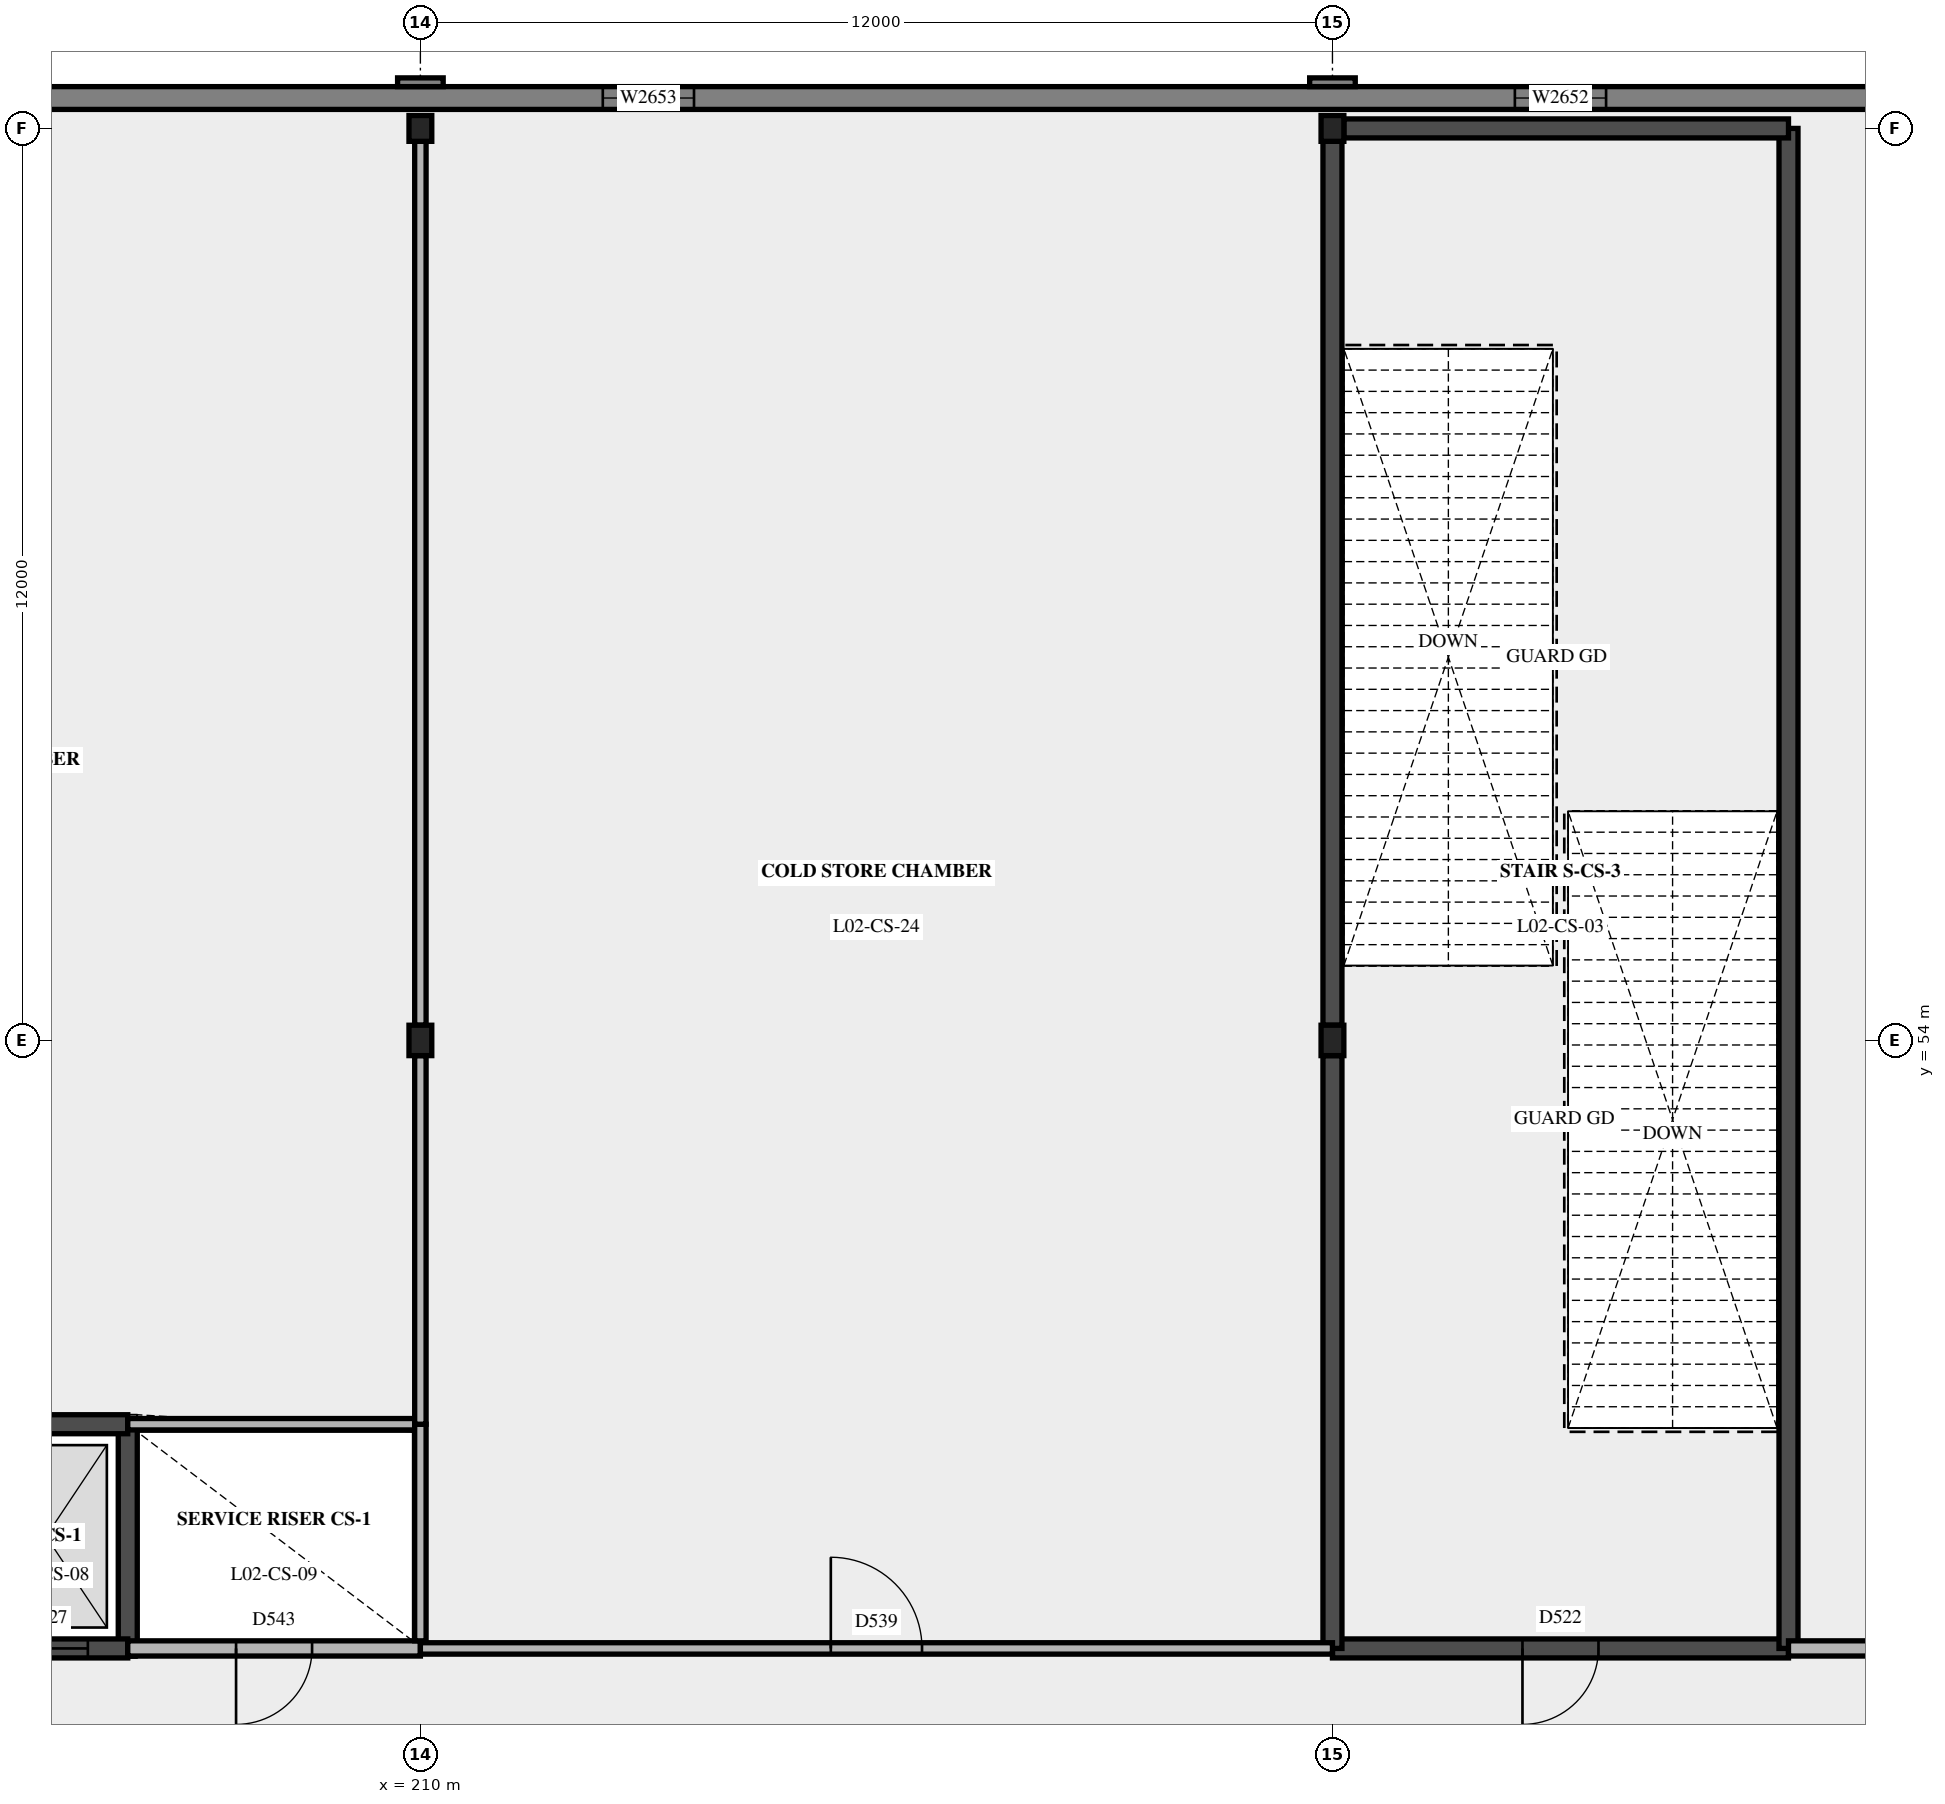
"""IFC4 building model, lengths in metres.
Left out: names, types, materials, properties, quantities, classifications, styles, units other than length and angle.
Written with IfcOpenShell. Run it as: python <this file> out.ifc"""

import sys

from ifc_helpers import new_model, si_unit, direction, frame, frame_2d, origin, origin_2d, place, context, subcontext, project, spatial, polyline, rectangle, i_section, outline, extrude, element, fill, save


model = new_model("IFC4")
c1 = context("Model", 3, precision=1e-05, world=origin(), true_north=direction((0.0, 1.0)))
c2 = subcontext(c1, "Body", "Model", "MODEL_VIEW")
j1 = project(units=[si_unit("LENGTHUNIT", "METRE"), si_unit("PLANEANGLEUNIT", "RADIAN")], contexts=[c1])
p1 = place(None, origin())
s1 = spatial("IfcSite", under=j1, at=p1, CompositionType="ELEMENT")
p2 = place(p1, origin())
s2 = spatial("IfcBuilding", under=s1, at=p2, CompositionType="ELEMENT")
p3 = place(p2, frame((0.0, 0.0, 10.8)))
s3 = spatial("IfcBuildingStorey", under=s2, at=p3, CompositionType="ELEMENT", Elevation=10.8)
p4 = place(p3, frame((210.0, 54.0, 0.0), z_axis=(0.0, 0.0, 1.0), x_axis=(1.0, 0.0, 0.0)))
e1 = element("IfcColumn", 1, at=p4, inside=s3, PredefinedType="COLUMN", context=c2, shape_type="SweptSolid", body=[
    extrude(i_section(OverallWidth=0.3, OverallDepth=0.4, WebThickness=0.013, FlangeThickness=0.024, at=origin_2d()), origin(), (0.0, 0.0, 1.0), 5.4),
])
p5 = place(p3, frame((210.0, 66.0, 0.0), z_axis=(0.0, 0.0, 1.0), x_axis=(1.0, 0.0, 0.0)))
e2 = element("IfcColumn", 2, at=p5, inside=s3, PredefinedType="COLUMN", context=c2, shape_type="SweptSolid", body=[
    extrude(i_section(OverallWidth=0.3, OverallDepth=0.34, WebThickness=0.012, FlangeThickness=0.021, at=origin_2d()), origin(), (0.0, 0.0, 1.0), 5.4),
])
p6 = place(p3, frame((222.0, 54.0, 0.0), z_axis=(0.0, 0.0, 1.0), x_axis=(1.0, 0.0, 0.0)))
e3 = element("IfcColumn", 3, at=p6, inside=s3, PredefinedType="COLUMN", context=c2, shape_type="SweptSolid", body=[
    extrude(i_section(OverallWidth=0.3, OverallDepth=0.4, WebThickness=0.013, FlangeThickness=0.024, at=origin_2d()), origin(), (0.0, 0.0, 1.0), 5.4),
])
p7 = place(p3, frame((222.0, 66.0, 0.0), z_axis=(0.0, 0.0, 1.0), x_axis=(1.0, 0.0, 0.0)))
e4 = element("IfcColumn", 4, at=p7, inside=s3, PredefinedType="COLUMN", context=c2, shape_type="SweptSolid", body=[
    extrude(i_section(OverallWidth=0.3, OverallDepth=0.34, WebThickness=0.012, FlangeThickness=0.021, at=origin_2d()), origin(), (0.0, 0.0, 1.0), 5.4),
])
p8 = place(p3, frame((222.0, 46.0, 0.0), z_axis=(0.0, 0.0, 1.0), x_axis=(1.0, 0.0, 0.0)))
e5 = element("IfcWall", 5, at=p8, inside=s3, PredefinedType="SHEAR", context=c2, shape_type="SweptSolid", body=[
    extrude(rectangle(XDim=6.0, YDim=0.25, at=frame_2d((3.0, 0.0))), origin(), (0.0, 0.0, 1.0), 5.15),
])
p9 = place(p8, frame((2.5, 0.0, 0.0)))
e6 = element("IfcOpeningElement", 6, at=p9, cuts=e5, PredefinedType="OPENING", context=c2, shape_type="SweptSolid", body=[
    extrude(rectangle(XDim=1.0, YDim=2.1, at=frame_2d((0.5, 1.05))), frame((0.0, 0.135, 0.0), z_axis=(0.0, -1.0, 0.0), x_axis=(1.0, 0.0, 0.0)), (0.0, 0.0, 1.0), 0.27),
])
p10 = place(p3, frame((228.0, 46.0, 0.0), z_axis=(0.0, 0.0, 1.0), x_axis=(0.0, 1.0, 0.0)))
e7 = element("IfcWall", 7, at=p10, inside=s3, PredefinedType="SHEAR", context=c2, shape_type="SweptSolid", body=[
    extrude(rectangle(XDim=20.0, YDim=0.25, at=frame_2d((10.0, 0.0))), origin(), (0.0, 0.0, 1.0), 5.15),
])
p11 = place(p3, frame((222.15, 66.0, 0.0), z_axis=(0.0, 0.0, 1.0), x_axis=(1.0, 0.0, 0.0)))
e8 = element("IfcWall", 8, at=p11, inside=s3, PredefinedType="SHEAR", context=c2, shape_type="SweptSolid", body=[
    extrude(rectangle(XDim=5.85, YDim=0.25, at=frame_2d((2.925, 0.0))), origin(), (0.0, 0.0, 1.0), 5.15),
])
p12 = place(p3, frame((222.0, 46.0, 0.0), z_axis=(0.0, 0.0, 1.0), x_axis=(0.0, 1.0, 0.0)))
e9 = element("IfcWall", 9, at=p12, inside=s3, PredefinedType="SHEAR", context=c2, shape_type="SweptSolid", body=[
    extrude(rectangle(XDim=7.8, YDim=0.25, at=frame_2d((3.9, 0.0))), origin(), (0.0, 0.0, 1.0), 5.15),
])
p13 = place(p3, frame((222.0, 54.2, 0.0), z_axis=(0.0, 0.0, 1.0), x_axis=(0.0, 1.0, 0.0)))
e10 = element("IfcWall", 10, at=p13, inside=s3, PredefinedType="SHEAR", context=c2, shape_type="SweptSolid", body=[
    extrude(rectangle(XDim=11.63, YDim=0.25, at=frame_2d((5.815, 0.0))), origin(), (0.0, 0.0, 1.0), 5.15),
])
p14 = place(p3, frame((282.25, 66.4, 0.0), z_axis=(0.0, 0.0, 1.0), x_axis=(-1.0, 0.0, 0.0)))
e11 = element("IfcWall", 11, at=p14, inside=s3, PredefinedType="SOLIDWALL", context=c2, shape_type="SweptSolid", body=[
    extrude(rectangle(XDim=84.5, YDim=0.3, at=frame_2d((42.25, 0.0))), origin(), (0.0, 0.0, 1.0), 5.4),
])
p15 = place(p14, frame((8.65, 0.0, 1.2)))
e12 = element("IfcOpeningElement", 12, at=p15, cuts=e11, PredefinedType="OPENING", context=c2, shape_type="SweptSolid", body=[
    extrude(rectangle(XDim=1.2, YDim=1.5, at=frame_2d((0.6, 0.75))), frame((0.0, 0.16, 0.0), z_axis=(0.0, -1.0, 0.0), x_axis=(1.0, 0.0, 0.0)), (0.0, 0.0, 1.0), 0.32),
])
p16 = place(p14, frame((20.65, 0.0, 1.2)))
e13 = element("IfcOpeningElement", 13, at=p16, cuts=e11, PredefinedType="OPENING", context=c2, shape_type="SweptSolid", body=[
    extrude(rectangle(XDim=1.2, YDim=1.5, at=frame_2d((0.6, 0.75))), frame((0.0, 0.16, 0.0), z_axis=(0.0, -1.0, 0.0), x_axis=(1.0, 0.0, 0.0)), (0.0, 0.0, 1.0), 0.32),
])
p17 = place(p14, frame((32.65, 0.0, 1.2)))
e14 = element("IfcOpeningElement", 14, at=p17, cuts=e11, PredefinedType="OPENING", context=c2, shape_type="SweptSolid", body=[
    extrude(rectangle(XDim=1.2, YDim=1.5, at=frame_2d((0.6, 0.75))), frame((0.0, 0.16, 0.0), z_axis=(0.0, -1.0, 0.0), x_axis=(1.0, 0.0, 0.0)), (0.0, 0.0, 1.0), 0.32),
])
p18 = place(p14, frame((44.65, 0.0, 1.2)))
e15 = element("IfcOpeningElement", 15, at=p18, cuts=e11, PredefinedType="OPENING", context=c2, shape_type="SweptSolid", body=[
    extrude(rectangle(XDim=1.2, YDim=1.5, at=frame_2d((0.6, 0.75))), frame((0.0, 0.16, 0.0), z_axis=(0.0, -1.0, 0.0), x_axis=(1.0, 0.0, 0.0)), (0.0, 0.0, 1.0), 0.32),
])
p19 = place(p14, frame((56.65, 0.0, 1.2)))
e16 = element("IfcOpeningElement", 16, at=p19, cuts=e11, PredefinedType="OPENING", context=c2, shape_type="SweptSolid", body=[
    extrude(rectangle(XDim=1.2, YDim=1.5, at=frame_2d((0.6, 0.75))), frame((0.0, 0.16, 0.0), z_axis=(0.0, -1.0, 0.0), x_axis=(1.0, 0.0, 0.0)), (0.0, 0.0, 1.0), 0.32),
])
p20 = place(p14, frame((68.65, 0.0, 1.2)))
e17 = element("IfcOpeningElement", 17, at=p20, cuts=e11, PredefinedType="OPENING", context=c2, shape_type="SweptSolid", body=[
    extrude(rectangle(XDim=1.2, YDim=1.5, at=frame_2d((0.6, 0.75))), frame((0.0, 0.16, 0.0), z_axis=(0.0, -1.0, 0.0), x_axis=(1.0, 0.0, 0.0)), (0.0, 0.0, 1.0), 0.32),
])
p21 = place(p14, frame((80.65, 0.0, 1.2)))
e18 = element("IfcOpeningElement", 18, at=p21, cuts=e11, PredefinedType="OPENING", context=c2, shape_type="SweptSolid", body=[
    extrude(rectangle(XDim=1.2, YDim=1.5, at=frame_2d((0.6, 0.75))), frame((0.0, 0.16, 0.0), z_axis=(0.0, -1.0, 0.0), x_axis=(1.0, 0.0, 0.0)), (0.0, 0.0, 1.0), 0.32),
])
for number, where, z_axis, x_axis in (
    (19, (222.3, 66.607, 0.0), (0.0, 0.0, 1.0), (-1.0, 0.0, 0.0)),
    (20, (210.3, 66.607, 0.0), (0.0, 0.0, 1.0), (-1.0, 0.0, 0.0)),
):
    element("IfcWall", number, at=place(p3, frame(where, z_axis=z_axis, x_axis=x_axis)), inside=s3, PredefinedType="SOLIDWALL", context=c2, shape_type="SweptSolid", body=[
        extrude(rectangle(XDim=0.6, YDim=0.115, at=frame_2d((0.3, 0.0))), origin(), (0.0, 0.0, 1.0), 5.4),
    ])
p22 = place(p3, frame((206.15, 46.0, 0.0), z_axis=(0.0, 0.0, 1.0), x_axis=(0.0, 1.0, 0.0)))
e21 = element("IfcWall", 21, at=p22, inside=s3, PredefinedType="SHEAR", context=c2, shape_type="SweptSolid", body=[
    extrude(rectangle(XDim=2.95, YDim=0.25, at=frame_2d((1.475, 0.0))), origin(), (0.0, 0.0, 1.0), 5.4),
])
p23 = place(p3, frame((206.15, 48.95, 0.0), z_axis=(0.0, 0.0, 1.0), x_axis=(-1.0, 0.0, 0.0)))
e22 = element("IfcWall", 22, at=p23, inside=s3, PredefinedType="SHEAR", context=c2, shape_type="SweptSolid", body=[
    extrude(rectangle(XDim=2.15, YDim=0.25, at=frame_2d((1.075, 0.0))), origin(), (0.0, 0.0, 1.0), 5.4),
])
p24 = place(p3, frame((204.0, 46.0, 0.0), z_axis=(0.0, 0.0, 1.0), x_axis=(1.0, 0.0, 0.0)))
e23 = element("IfcWall", 23, at=p24, inside=s3, PredefinedType="SHEAR", context=c2, shape_type="SweptSolid", body=[
    extrude(rectangle(XDim=2.15, YDim=0.25, at=frame_2d((1.075, 0.0))), origin(), (0.0, 0.0, 1.0), 5.4),
])
p25 = place(p24, frame((0.525, 0.0, 0.0)))
e24 = element("IfcOpeningElement", 24, at=p25, cuts=e23, PredefinedType="OPENING", context=c2, shape_type="SweptSolid", body=[
    extrude(rectangle(XDim=1.1, YDim=2.1, at=frame_2d((0.55, 1.05))), frame((0.0, 0.135, 0.0), z_axis=(0.0, -1.0, 0.0), x_axis=(1.0, 0.0, 0.0)), (0.0, 0.0, 1.0), 0.27),
])
p26 = place(p3, frame((206.15, 46.0, 0.0), z_axis=(0.0, 0.0, 1.0), x_axis=(1.0, 0.0, 0.0)))
e25 = element("IfcWall", 25, at=p26, inside=s3, PredefinedType="PARTITIONING", context=c2, shape_type="SweptSolid", body=[
    extrude(outline(polyline([(0.0, 0.0), (3.85, 0.0), (3.85, 4.68), (3.755, 4.68), (3.75, 5.15), (1.555, 5.15), (1.55, 4.63), (1.35, 4.63), (1.345, 5.15), (0.0, 5.15), (0.0, 0.0)])), frame((0.0, 0.1, 0.0), z_axis=(0.0, -1.0, 0.0), x_axis=(1.0, 0.0, 0.0)), (0.0, 0.0, 1.0), 0.2),
])
p27 = place(p26, frame((1.425, 0.0, 0.0)))
e26 = element("IfcOpeningElement", 26, at=p27, cuts=e25, PredefinedType="OPENING", context=c2, shape_type="SweptSolid", body=[
    extrude(rectangle(XDim=1.0, YDim=2.1, at=frame_2d((0.5, 1.05))), frame((0.0, 0.11, 0.0), z_axis=(0.0, -1.0, 0.0), x_axis=(1.0, 0.0, 0.0)), (0.0, 0.0, 1.0), 0.22),
])
p28 = place(p3, frame((210.0, 46.0, 0.0), z_axis=(0.0, 0.0, 1.0), x_axis=(1.0, 0.0, 0.0)))
e27 = element("IfcWall", 27, at=p28, inside=s3, PredefinedType="PARTITIONING", context=c2, shape_type="SweptSolid", body=[
    extrude(outline(polyline([(0.0, 0.0), (12.0, 0.0), (12.0, 5.15), (9.705, 5.15), (9.7, 4.63), (9.5, 4.63), (9.495, 5.15), (7.305, 5.15), (7.3, 4.63), (7.1, 4.63), (7.095, 5.15), (4.905, 5.15), (4.9, 4.63), (4.7, 4.63), (4.695, 5.15), (2.505, 5.15), (2.5, 4.63), (2.3, 4.63), (2.295, 5.15), (0.1, 5.15), (0.095, 4.68), (0.0, 4.68), (0.0, 0.0)])), frame((0.0, 0.075, 0.0), z_axis=(0.0, -1.0, 0.0), x_axis=(1.0, 0.0, 0.0)), (0.0, 0.0, 1.0), 0.15),
])
p29 = place(p28, frame((5.4, 0.0, 0.0)))
e28 = element("IfcOpeningElement", 28, at=p29, cuts=e27, PredefinedType="OPENING", context=c2, shape_type="SweptSolid", body=[
    extrude(rectangle(XDim=1.2, YDim=2.4, at=frame_2d((0.6, 1.2))), frame((0.0, 0.085, 0.0), z_axis=(0.0, -1.0, 0.0), x_axis=(1.0, 0.0, 0.0)), (0.0, 0.0, 1.0), 0.17),
])
p30 = place(p3, frame((228.0, 46.0, 0.0), z_axis=(0.0, 0.0, 1.0), x_axis=(1.0, 0.0, 0.0)))
e29 = element("IfcWall", 29, at=p30, inside=s3, PredefinedType="PARTITIONING", context=c2, shape_type="SweptSolid", body=[
    extrude(outline(polyline([(0.0, 0.0), (18.0, 0.0), (18.0, 5.15), (15.705, 5.15), (15.7, 4.63), (15.5, 4.63), (15.495, 5.15), (13.305, 5.15), (13.3, 4.63), (13.1, 4.63), (13.095, 5.15), (10.905, 5.15), (10.9, 4.63), (10.7, 4.63), (10.695, 5.15), (8.505, 5.15), (8.5, 4.63), (8.3, 4.63), (8.295, 5.15), (6.1, 5.15), (6.095, 4.68), (5.905, 4.68), (5.9, 5.15), (3.705, 5.15), (3.7, 4.63), (3.5, 4.63), (3.495, 5.15), (1.305, 5.15), (1.3, 4.63), (1.1, 4.63), (1.095, 5.15), (0.0, 5.15), (0.0, 0.0)])), frame((0.0, 0.1, 0.0), z_axis=(0.0, -1.0, 0.0), x_axis=(1.0, 0.0, 0.0)), (0.0, 0.0, 1.0), 0.2),
])
p31 = place(p30, frame((8.1, 0.0, 0.0)))
e30 = element("IfcOpeningElement", 30, at=p31, cuts=e29, PredefinedType="OPENING", context=c2, shape_type="SweptSolid", body=[
    extrude(rectangle(XDim=1.8, YDim=2.1, at=frame_2d((0.9, 1.05))), frame((0.0, 0.11, 0.0), z_axis=(0.0, -1.0, 0.0), x_axis=(1.0, 0.0, 0.0)), (0.0, 0.0, 1.0), 0.22),
])
p32 = place(p3, frame((206.15, 48.95, 0.0), z_axis=(0.0, 0.0, 1.0), x_axis=(1.0, 0.0, 0.0)))
e31 = element("IfcWall", 31, at=p32, inside=s3, PredefinedType="PARTITIONING", context=c2, shape_type="SweptSolid", body=[
    extrude(outline(polyline([(0.0, 0.0), (3.775, 0.0), (3.775, 4.68), (3.755, 4.68), (3.75, 5.15), (1.555, 5.15), (1.55, 4.63), (1.35, 4.63), (1.345, 5.15), (0.0, 5.15), (0.0, 0.0)])), frame((0.0, 0.075, 0.0), z_axis=(0.0, -1.0, 0.0), x_axis=(1.0, 0.0, 0.0)), (0.0, 0.0, 1.0), 0.15),
])
p33 = place(p3, frame((210.0, 46.1, 0.0), z_axis=(0.0, 0.0, 1.0), x_axis=(0.0, 1.0, 0.0)))
e32 = element("IfcWall", 32, at=p33, inside=s3, PredefinedType="PARTITIONING", context=c2, shape_type="SweptSolid", body=[
    extrude(rectangle(XDim=2.85, YDim=0.15, at=frame_2d((1.425, 0.0))), origin(), (0.0, 0.0, 1.0), 4.68),
])
p34 = place(p3, frame((210.0, 48.95, 0.0), z_axis=(0.0, 0.0, 1.0), x_axis=(0.0, 1.0, 0.0)))
e33 = element("IfcWall", 33, at=p34, inside=s3, PredefinedType="PARTITIONING", context=c2, shape_type="SweptSolid", body=[
    extrude(rectangle(XDim=4.85, YDim=0.15, at=frame_2d((2.425, 0.0))), origin(), (0.0, 0.0, 1.0), 4.68),
])
p35 = place(p3, frame((210.0, 54.2, 0.0), z_axis=(0.0, 0.0, 1.0), x_axis=(0.0, 1.0, 0.0)))
e34 = element("IfcWall", 34, at=p35, inside=s3, PredefinedType="PARTITIONING", context=c2, shape_type="SweptSolid", body=[
    extrude(rectangle(XDim=11.63, YDim=0.15, at=frame_2d((5.815, 0.0))), origin(), (0.0, 0.0, 1.0), 4.68),
])
p36 = place(p19, origin())
e35 = element("IfcWindow", 35, at=p36, inside=s3, PartitioningType="SINGLE_PANEL", PredefinedType="WINDOW", context=c2, shape_type="SweptSolid", body=[
    extrude(rectangle(XDim=1.2, YDim=1.5, at=frame_2d((0.6, 0.75))), frame((0.0, 0.03, 0.0), z_axis=(0.0, -1.0, 0.0), x_axis=(1.0, 0.0, 0.0)), (0.0, 0.0, 1.0), 0.06),
])
fill(e16, e35)
p37 = place(p20, origin())
e36 = element("IfcWindow", 36, at=p37, inside=s3, PartitioningType="SINGLE_PANEL", PredefinedType="WINDOW", context=c2, shape_type="SweptSolid", body=[
    extrude(rectangle(XDim=1.2, YDim=1.5, at=frame_2d((0.6, 0.75))), frame((0.0, 0.03, 0.0), z_axis=(0.0, -1.0, 0.0), x_axis=(1.0, 0.0, 0.0)), (0.0, 0.0, 1.0), 0.06),
])
fill(e17, e36)
p38 = place(p25, origin())
e37 = element("IfcDoor", 37, at=p38, inside=s3, OperationType="SLIDING_TO_LEFT", PredefinedType="DOOR", context=c2, shape_type="SweptSolid", body=[
    extrude(rectangle(XDim=1.1, YDim=2.1, at=frame_2d((0.55, 1.05))), frame((0.0, 0.025, 0.0), z_axis=(0.0, -1.0, 0.0), x_axis=(1.0, 0.0, 0.0)), (0.0, 0.0, 1.0), 0.05),
])
fill(e24, e37)
p39 = place(p9, origin())
e38 = element("IfcDoor", 38, at=p39, inside=s3, OperationType="SINGLE_SWING_RIGHT", PredefinedType="DOOR", context=c2, shape_type="SweptSolid", body=[
    extrude(rectangle(XDim=1.0, YDim=2.1, at=frame_2d((0.5, 1.05))), frame((0.0, 0.025, 0.0), z_axis=(0.0, -1.0, 0.0), x_axis=(1.0, 0.0, 0.0)), (0.0, 0.0, 1.0), 0.05),
])
fill(e6, e38)
p40 = place(p29, origin())
e39 = element("IfcDoor", 39, at=p40, inside=s3, OperationType="SINGLE_SWING_LEFT", PredefinedType="DOOR", context=c2, shape_type="SweptSolid", body=[
    extrude(rectangle(XDim=1.2, YDim=2.4, at=frame_2d((0.6, 1.2))), frame((0.0, 0.025, 0.0), z_axis=(0.0, -1.0, 0.0), x_axis=(1.0, 0.0, 0.0)), (0.0, 0.0, 1.0), 0.05),
])
fill(e28, e39)
p41 = place(p27, origin())
e40 = element("IfcDoor", 40, at=p41, inside=s3, OperationType="SINGLE_SWING_RIGHT", PredefinedType="DOOR", context=c2, shape_type="SweptSolid", body=[
    extrude(rectangle(XDim=1.0, YDim=2.1, at=frame_2d((0.5, 1.05))), frame((0.0, 0.025, 0.0), z_axis=(0.0, -1.0, 0.0), x_axis=(1.0, 0.0, 0.0)), (0.0, 0.0, 1.0), 0.05),
])
fill(e26, e40)
save(model, sys.argv[1])
